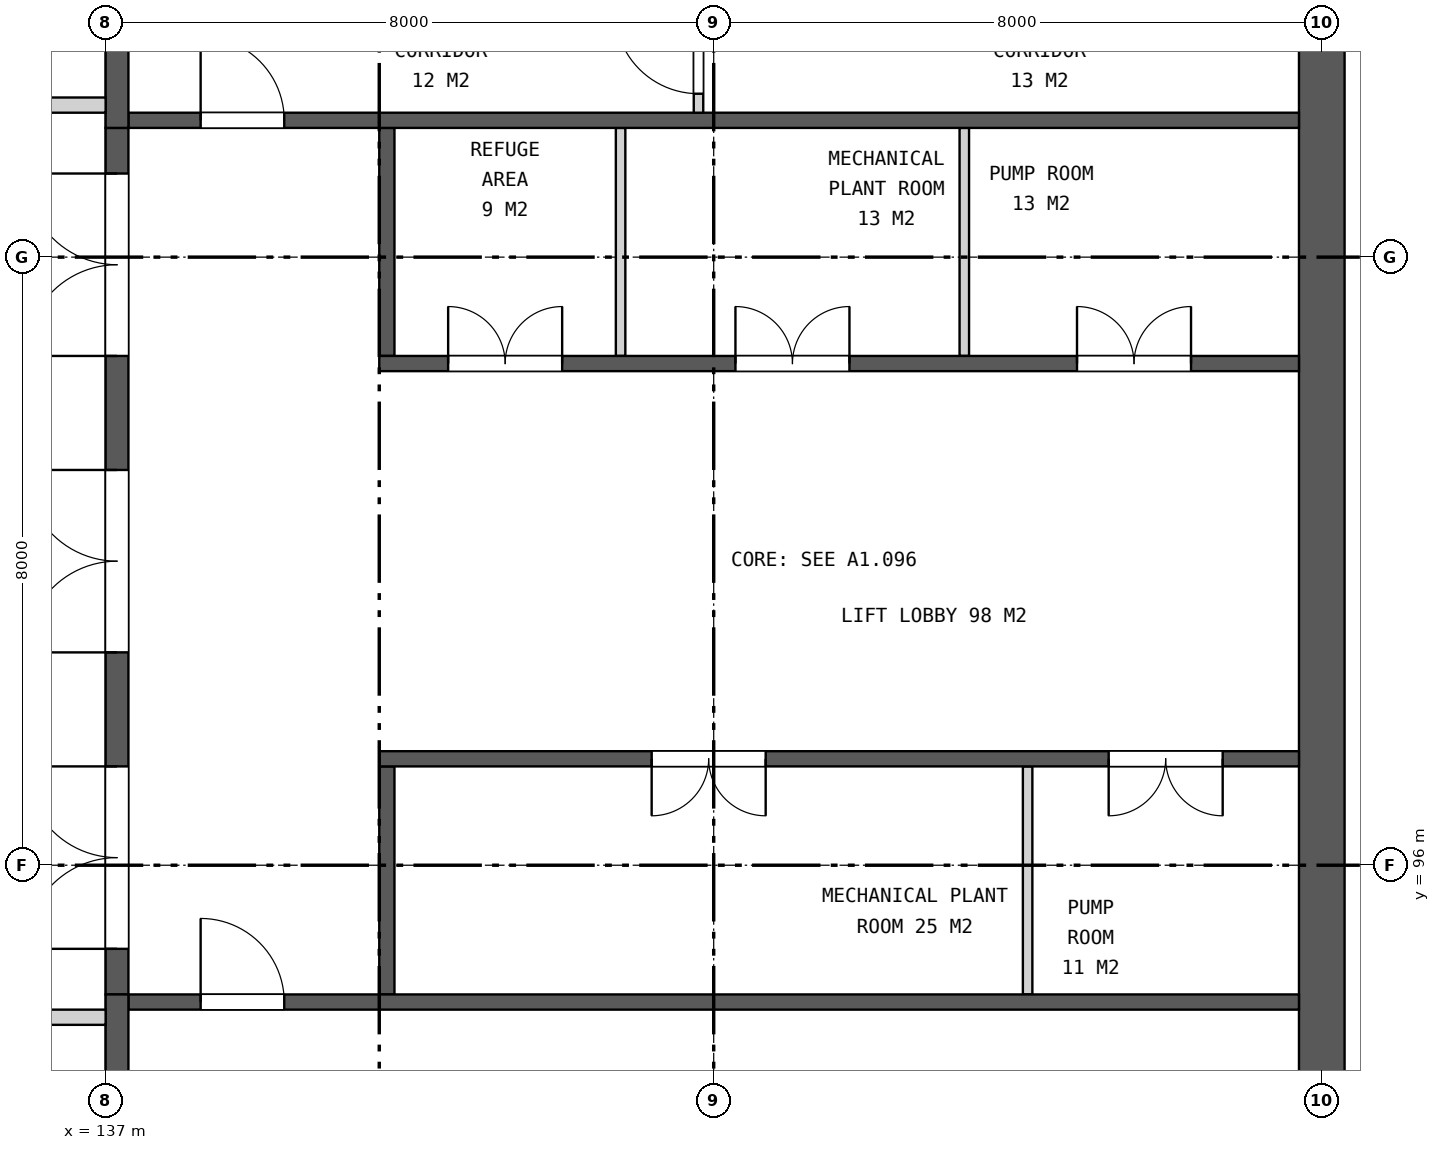
"""IFC4 building model, lengths in metres.
Left out: names, types, materials, properties, quantities, classifications, styles, units other than length and angle.
Written with IfcOpenShell. Run it as: python <this file> out.ifc"""

import sys

from ifc_helpers import new_model, si_unit, direction, frame, frame_2d, origin, place, context, subcontext, project, spatial, rectangle, extrude, element, fill, save


model = new_model("IFC4")
c1 = context("Model", 3, precision=1e-05, world=origin(), true_north=direction((0.0, 1.0)))
c2 = subcontext(c1, "Body", "Model", "MODEL_VIEW")
j1 = project(units=[si_unit("LENGTHUNIT", "METRE"), si_unit("PLANEANGLEUNIT", "RADIAN")], contexts=[c1])
p1 = place(None, origin())
s1 = spatial("IfcSite", under=j1, at=p1, CompositionType="ELEMENT")
p2 = place(p1, origin())
s2 = spatial("IfcBuilding", under=s1, at=p2, CompositionType="ELEMENT")
p3 = place(p2, frame((0.0, 0.0, 237.7)))
s3 = spatial("IfcBuildingStorey", under=s2, at=p3, CompositionType="ELEMENT", Elevation=237.7)
p4 = place(p3, frame((153.0, 88.3, 0.0), z_axis=(0.0, 0.0, 1.0), x_axis=(0.0, 1.0, 0.0)))
e1 = element("IfcWall", 1, at=p4, inside=s3, PredefinedType="SHEAR", context=c2, shape_type="SweptSolid", body=[
    extrude(rectangle(XDim=23.4, YDim=0.6, at=frame_2d((11.7, 0.0))), origin(), (0.0, 0.0, 1.0), 7.4),
])
p5 = place(p3, frame((137.15, 94.3, 0.0), z_axis=(0.0, 0.0, 1.0), x_axis=(0.0, 1.0, 0.0)))
e2 = element("IfcWall", 2, at=p5, inside=s3, PredefinedType="SHEAR", context=c2, shape_type="SweptSolid", body=[
    extrude(rectangle(XDim=11.4, YDim=0.3, at=frame_2d((5.7, 0.0))), origin(), (0.0, 0.0, 1.0), 7.4),
])
p6 = place(p5, frame((0.6, 0.0, 0.0)))
e3 = element("IfcOpeningElement", 3, at=p6, cuts=e2, PredefinedType="OPENING", context=c2, shape_type="SweptSolid", body=[
    extrude(rectangle(XDim=2.4, YDim=2.4, at=frame_2d((1.2, 1.2))), frame((0.0, 0.16, 0.0), z_axis=(0.0, -1.0, 0.0), x_axis=(1.0, 0.0, 0.0)), (0.0, 0.0, 1.0), 0.32),
])
p7 = place(p5, frame((4.5, 0.0, 0.0)))
e4 = element("IfcOpeningElement", 4, at=p7, cuts=e2, PredefinedType="OPENING", context=c2, shape_type="SweptSolid", body=[
    extrude(rectangle(XDim=2.4, YDim=2.4, at=frame_2d((1.2, 1.2))), frame((0.0, 0.16, 0.0), z_axis=(0.0, -1.0, 0.0), x_axis=(1.0, 0.0, 0.0)), (0.0, 0.0, 1.0), 0.32),
])
p8 = place(p5, frame((8.4, 0.0, 0.0)))
e5 = element("IfcOpeningElement", 5, at=p8, cuts=e2, PredefinedType="OPENING", context=c2, shape_type="SweptSolid", body=[
    extrude(rectangle(XDim=2.4, YDim=2.4, at=frame_2d((1.2, 1.2))), frame((0.0, 0.16, 0.0), z_axis=(0.0, -1.0, 0.0), x_axis=(1.0, 0.0, 0.0)), (0.0, 0.0, 1.0), 0.32),
])
p9 = place(p3, frame((140.7, 102.7, 0.0), z_axis=(0.0, 0.0, 1.0), x_axis=(0.0, 1.0, 0.0)))
e6 = element("IfcWall", 6, at=p9, inside=s3, PredefinedType="SHEAR", context=c2, shape_type="SweptSolid", body=[
    extrude(rectangle(XDim=3.0, YDim=0.2, at=frame_2d((1.5, 0.0))), origin(), (0.0, 0.0, 1.0), 7.4),
])
for number, where, z_axis, x_axis in (
    (7, (143.775, 102.7, 0.0), (0.0, 0.0, 1.0), (0.0, 1.0, 0.0)),
    (8, (148.297, 102.7, 0.0), (0.0, 0.0, 1.0), (0.0, 1.0, 0.0)),
):
    element("IfcWall", number, at=place(p3, frame(where, z_axis=z_axis, x_axis=x_axis)), inside=s3, PredefinedType="PARTITIONING", context=c2, shape_type="SweptSolid", body=[
        extrude(rectangle(XDim=3.0, YDim=0.125, at=frame_2d((1.5, 0.0))), origin(), (0.0, 0.0, 1.0), 7.4),
    ])
p10 = place(p3, frame((140.6, 102.6, 0.0), z_axis=(0.0, 0.0, 1.0), x_axis=(1.0, 0.0, 0.0)))
e9 = element("IfcWall", 9, at=p10, inside=s3, PredefinedType="SHEAR", context=c2, shape_type="SweptSolid", body=[
    extrude(rectangle(XDim=12.1, YDim=0.2, at=frame_2d((6.05, 0.0))), origin(), (0.0, 0.0, 1.0), 7.4),
])
p11 = place(p10, frame((0.906, 0.0, 0.0)))
e10 = element("IfcOpeningElement", 10, at=p11, cuts=e9, PredefinedType="OPENING", context=c2, shape_type="SweptSolid", body=[
    extrude(rectangle(XDim=1.5, YDim=2.1, at=frame_2d((0.75, 1.05))), frame((0.0, 0.11, 0.0), z_axis=(0.0, -1.0, 0.0), x_axis=(1.0, 0.0, 0.0)), (0.0, 0.0, 1.0), 0.22),
])
p12 = place(p10, frame((4.686, 0.0, 0.0)))
e11 = element("IfcOpeningElement", 11, at=p12, cuts=e9, PredefinedType="OPENING", context=c2, shape_type="SweptSolid", body=[
    extrude(rectangle(XDim=1.5, YDim=2.1, at=frame_2d((0.75, 1.05))), frame((0.0, 0.11, 0.0), z_axis=(0.0, -1.0, 0.0), x_axis=(1.0, 0.0, 0.0)), (0.0, 0.0, 1.0), 0.22),
])
p13 = place(p10, frame((9.18, 0.0, 0.0)))
e12 = element("IfcOpeningElement", 12, at=p13, cuts=e9, PredefinedType="OPENING", context=c2, shape_type="SweptSolid", body=[
    extrude(rectangle(XDim=1.5, YDim=2.1, at=frame_2d((0.75, 1.05))), frame((0.0, 0.11, 0.0), z_axis=(0.0, -1.0, 0.0), x_axis=(1.0, 0.0, 0.0)), (0.0, 0.0, 1.0), 0.22),
])
p14 = place(p3, frame((140.7, 94.3, 0.0), z_axis=(0.0, 0.0, 1.0), x_axis=(0.0, 1.0, 0.0)))
e13 = element("IfcWall", 13, at=p14, inside=s3, PredefinedType="SHEAR", context=c2, shape_type="SweptSolid", body=[
    extrude(rectangle(XDim=3.0, YDim=0.2, at=frame_2d((1.5, 0.0))), origin(), (0.0, 0.0, 1.0), 7.4),
])
p15 = place(p3, frame((149.13, 94.3, 0.0), z_axis=(0.0, 0.0, 1.0), x_axis=(0.0, 1.0, 0.0)))
e14 = element("IfcWall", 14, at=p15, inside=s3, PredefinedType="PARTITIONING", context=c2, shape_type="SweptSolid", body=[
    extrude(rectangle(XDim=3.0, YDim=0.125, at=frame_2d((1.5, 0.0))), origin(), (0.0, 0.0, 1.0), 7.4),
])
p16 = place(p3, frame((140.6, 97.4, 0.0), z_axis=(0.0, 0.0, 1.0), x_axis=(1.0, 0.0, 0.0)))
e15 = element("IfcWall", 15, at=p16, inside=s3, PredefinedType="SHEAR", context=c2, shape_type="SweptSolid", body=[
    extrude(rectangle(XDim=12.1, YDim=0.2, at=frame_2d((6.05, 0.0))), origin(), (0.0, 0.0, 1.0), 7.4),
])
p17 = place(p16, frame((3.584, 0.0, 0.0)))
e16 = element("IfcOpeningElement", 16, at=p17, cuts=e15, PredefinedType="OPENING", context=c2, shape_type="SweptSolid", body=[
    extrude(rectangle(XDim=1.5, YDim=2.1, at=frame_2d((0.75, 1.05))), frame((0.0, 0.11, 0.0), z_axis=(0.0, -1.0, 0.0), x_axis=(1.0, 0.0, 0.0)), (0.0, 0.0, 1.0), 0.22),
])
p18 = place(p16, frame((9.596, 0.0, 0.0)))
e17 = element("IfcOpeningElement", 17, at=p18, cuts=e15, PredefinedType="OPENING", context=c2, shape_type="SweptSolid", body=[
    extrude(rectangle(XDim=1.5, YDim=2.1, at=frame_2d((0.75, 1.05))), frame((0.0, 0.11, 0.0), z_axis=(0.0, -1.0, 0.0), x_axis=(1.0, 0.0, 0.0)), (0.0, 0.0, 1.0), 0.22),
])
p19 = place(p3, frame((137.3, 105.8, 0.0), z_axis=(0.0, 0.0, 1.0), x_axis=(1.0, 0.0, 0.0)))
e18 = element("IfcWall", 18, at=p19, inside=s3, PredefinedType="SHEAR", context=c2, shape_type="SweptSolid", body=[
    extrude(rectangle(XDim=15.4, YDim=0.2, at=frame_2d((7.7, 0.0))), origin(), (0.0, 0.0, 1.0), 7.4),
])
p20 = place(p19, frame((0.95, 0.0, 0.0)))
e19 = element("IfcOpeningElement", 19, at=p20, cuts=e18, PredefinedType="OPENING", context=c2, shape_type="SweptSolid", body=[
    extrude(rectangle(XDim=1.1, YDim=2.1, at=frame_2d((0.55, 1.05))), frame((0.0, 0.11, 0.0), z_axis=(0.0, -1.0, 0.0), x_axis=(1.0, 0.0, 0.0)), (0.0, 0.0, 1.0), 0.22),
])
p21 = place(p3, frame((137.15, 105.7, 0.0), z_axis=(0.0, 0.0, 1.0), x_axis=(0.0, 1.0, 0.0)))
e20 = element("IfcWall", 20, at=p21, inside=s3, PredefinedType="SHEAR", context=c2, shape_type="SweptSolid", body=[
    extrude(rectangle(XDim=6.0, YDim=0.3, at=frame_2d((3.0, 0.0))), origin(), (0.0, 0.0, 1.0), 7.4),
])
p22 = place(p3, frame((144.8, 105.9, 0.0), z_axis=(0.0, 0.0, 1.0), x_axis=(0.0, 1.0, 0.0)))
e21 = element("IfcWall", 21, at=p22, inside=s3, PredefinedType="PARTITIONING", context=c2, shape_type="SweptSolid", body=[
    extrude(rectangle(XDim=1.6, YDim=0.125, at=frame_2d((0.8, 0.0))), origin(), (0.0, 0.0, 1.0), 7.4),
])
p23 = place(p22, frame((0.25, 0.0, 0.0)))
e22 = element("IfcOpeningElement", 22, at=p23, cuts=e21, PredefinedType="OPENING", context=c2, shape_type="SweptSolid", body=[
    extrude(rectangle(XDim=1.1, YDim=2.1, at=frame_2d((0.55, 1.05))), frame((0.0, 0.073, 0.0), z_axis=(0.0, -1.0, 0.0), x_axis=(1.0, 0.0, 0.0)), (0.0, 0.0, 1.0), 0.145),
])
p24 = place(p3, frame((137.3, 94.2, 0.0), z_axis=(0.0, 0.0, 1.0), x_axis=(1.0, 0.0, 0.0)))
e23 = element("IfcWall", 23, at=p24, inside=s3, PredefinedType="SHEAR", context=c2, shape_type="SweptSolid", body=[
    extrude(rectangle(XDim=15.4, YDim=0.2, at=frame_2d((7.7, 0.0))), origin(), (0.0, 0.0, 1.0), 7.4),
])
p25 = place(p24, frame((0.95, 0.0, 0.0)))
e24 = element("IfcOpeningElement", 24, at=p25, cuts=e23, PredefinedType="OPENING", context=c2, shape_type="SweptSolid", body=[
    extrude(rectangle(XDim=1.1, YDim=2.1, at=frame_2d((0.55, 1.05))), frame((0.0, 0.11, 0.0), z_axis=(0.0, -1.0, 0.0), x_axis=(1.0, 0.0, 0.0)), (0.0, 0.0, 1.0), 0.22),
])
p26 = place(p3, frame((137.15, 88.3, 0.0), z_axis=(0.0, 0.0, 1.0), x_axis=(0.0, 1.0, 0.0)))
e25 = element("IfcWall", 25, at=p26, inside=s3, PredefinedType="SHEAR", context=c2, shape_type="SweptSolid", body=[
    extrude(rectangle(XDim=6.0, YDim=0.3, at=frame_2d((3.0, 0.0))), origin(), (0.0, 0.0, 1.0), 7.4),
])
p27 = place(p3, frame((131.5, 94.0, 0.0), z_axis=(0.0, 0.0, 1.0), x_axis=(1.0, 0.0, 0.0)))
e26 = element("IfcWall", 26, at=p27, inside=s3, PredefinedType="SOLIDWALL", context=c2, shape_type="SweptSolid", body=[
    extrude(rectangle(XDim=5.5, YDim=0.2, at=frame_2d((2.75, 0.0))), origin(), (0.0, 0.0, 1.0), 6.643),
])
p28 = place(p27, frame((2.25, 0.0, 0.0)))
e27 = element("IfcOpeningElement", 27, at=p28, cuts=e26, PredefinedType="OPENING", context=c2, shape_type="SweptSolid", body=[
    extrude(rectangle(XDim=1.0, YDim=2.1, at=frame_2d((0.5, 1.05))), frame((0.0, 0.11, 0.0), z_axis=(0.0, -1.0, 0.0), x_axis=(1.0, 0.0, 0.0)), (0.0, 0.0, 1.0), 0.22),
])
p29 = place(p3, frame((131.5, 106.0, 0.0), z_axis=(0.0, 0.0, 1.0), x_axis=(1.0, 0.0, 0.0)))
e28 = element("IfcWall", 28, at=p29, inside=s3, PredefinedType="SOLIDWALL", context=c2, shape_type="SweptSolid", body=[
    extrude(rectangle(XDim=5.5, YDim=0.2, at=frame_2d((2.75, 0.0))), origin(), (0.0, 0.0, 1.0), 6.643),
])
p30 = place(p29, frame((2.25, 0.0, 0.0)))
e29 = element("IfcOpeningElement", 29, at=p30, cuts=e28, PredefinedType="OPENING", context=c2, shape_type="SweptSolid", body=[
    extrude(rectangle(XDim=1.0, YDim=2.1, at=frame_2d((0.5, 1.05))), frame((0.0, 0.11, 0.0), z_axis=(0.0, -1.0, 0.0), x_axis=(1.0, 0.0, 0.0)), (0.0, 0.0, 1.0), 0.22),
])
p31 = place(p6, origin())
e30 = element("IfcDoor", 30, at=p31, inside=s3, OperationType="DOUBLE_DOOR_SINGLE_SWING", PredefinedType="DOOR", context=c2, shape_type="SweptSolid", body=[
    extrude(rectangle(XDim=2.4, YDim=2.4, at=frame_2d((1.2, 1.2))), frame((0.0, 0.025, 0.0), z_axis=(0.0, -1.0, 0.0), x_axis=(1.0, 0.0, 0.0)), (0.0, 0.0, 1.0), 0.05),
])
fill(e3, e30)
p32 = place(p7, origin())
e31 = element("IfcDoor", 31, at=p32, inside=s3, OperationType="DOUBLE_DOOR_SINGLE_SWING", PredefinedType="DOOR", context=c2, shape_type="SweptSolid", body=[
    extrude(rectangle(XDim=2.4, YDim=2.4, at=frame_2d((1.2, 1.2))), frame((0.0, 0.025, 0.0), z_axis=(0.0, -1.0, 0.0), x_axis=(1.0, 0.0, 0.0)), (0.0, 0.0, 1.0), 0.05),
])
fill(e4, e31)
p33 = place(p8, origin())
e32 = element("IfcDoor", 32, at=p33, inside=s3, OperationType="DOUBLE_DOOR_SINGLE_SWING", PredefinedType="DOOR", context=c2, shape_type="SweptSolid", body=[
    extrude(rectangle(XDim=2.4, YDim=2.4, at=frame_2d((1.2, 1.2))), frame((0.0, 0.025, 0.0), z_axis=(0.0, -1.0, 0.0), x_axis=(1.0, 0.0, 0.0)), (0.0, 0.0, 1.0), 0.05),
])
fill(e5, e32)
p34 = place(p11, origin())
e33 = element("IfcDoor", 33, at=p34, inside=s3, OperationType="DOUBLE_DOOR_SINGLE_SWING", PredefinedType="DOOR", context=c2, shape_type="SweptSolid", body=[
    extrude(rectangle(XDim=1.5, YDim=2.1, at=frame_2d((0.75, 1.05))), frame((0.0, 0.025, 0.0), z_axis=(0.0, -1.0, 0.0), x_axis=(1.0, 0.0, 0.0)), (0.0, 0.0, 1.0), 0.05),
])
fill(e10, e33)
p35 = place(p12, origin())
e34 = element("IfcDoor", 34, at=p35, inside=s3, OperationType="DOUBLE_DOOR_SINGLE_SWING", PredefinedType="DOOR", context=c2, shape_type="SweptSolid", body=[
    extrude(rectangle(XDim=1.5, YDim=2.1, at=frame_2d((0.75, 1.05))), frame((0.0, 0.025, 0.0), z_axis=(0.0, -1.0, 0.0), x_axis=(1.0, 0.0, 0.0)), (0.0, 0.0, 1.0), 0.05),
])
fill(e11, e34)
p36 = place(p13, origin())
e35 = element("IfcDoor", 35, at=p36, inside=s3, OperationType="DOUBLE_DOOR_SINGLE_SWING", PredefinedType="DOOR", context=c2, shape_type="SweptSolid", body=[
    extrude(rectangle(XDim=1.5, YDim=2.1, at=frame_2d((0.75, 1.05))), frame((0.0, 0.025, 0.0), z_axis=(0.0, -1.0, 0.0), x_axis=(1.0, 0.0, 0.0)), (0.0, 0.0, 1.0), 0.05),
])
fill(e12, e35)
p37 = place(p17, frame((1.5, 0.0, 0.0), z_axis=(0.0, 0.0, 1.0), x_axis=(-1.0, 0.0, 0.0)))
e36 = element("IfcDoor", 36, at=p37, inside=s3, OperationType="DOUBLE_DOOR_SINGLE_SWING", PredefinedType="DOOR", context=c2, shape_type="SweptSolid", body=[
    extrude(rectangle(XDim=1.5, YDim=2.1, at=frame_2d((0.75, 1.05))), frame((0.0, 0.025, 0.0), z_axis=(0.0, -1.0, 0.0), x_axis=(1.0, 0.0, 0.0)), (0.0, 0.0, 1.0), 0.05),
])
fill(e16, e36)
p38 = place(p18, frame((1.5, 0.0, 0.0), z_axis=(0.0, 0.0, 1.0), x_axis=(-1.0, 0.0, 0.0)))
e37 = element("IfcDoor", 37, at=p38, inside=s3, OperationType="DOUBLE_DOOR_SINGLE_SWING", PredefinedType="DOOR", context=c2, shape_type="SweptSolid", body=[
    extrude(rectangle(XDim=1.5, YDim=2.1, at=frame_2d((0.75, 1.05))), frame((0.0, 0.025, 0.0), z_axis=(0.0, -1.0, 0.0), x_axis=(1.0, 0.0, 0.0)), (0.0, 0.0, 1.0), 0.05),
])
fill(e17, e37)
p39 = place(p20, origin())
e38 = element("IfcDoor", 38, at=p39, inside=s3, OperationType="SINGLE_SWING_LEFT", PredefinedType="DOOR", context=c2, shape_type="SweptSolid", body=[
    extrude(rectangle(XDim=1.1, YDim=2.1, at=frame_2d((0.55, 1.05))), frame((0.0, 0.025, 0.0), z_axis=(0.0, -1.0, 0.0), x_axis=(1.0, 0.0, 0.0)), (0.0, 0.0, 1.0), 0.05),
])
fill(e19, e38)
p40 = place(p23, origin())
e39 = element("IfcDoor", 39, at=p40, inside=s3, OperationType="SINGLE_SWING_RIGHT", PredefinedType="DOOR", context=c2, shape_type="SweptSolid", body=[
    extrude(rectangle(XDim=1.1, YDim=2.1, at=frame_2d((0.55, 1.05))), frame((0.0, 0.025, 0.0), z_axis=(0.0, -1.0, 0.0), x_axis=(1.0, 0.0, 0.0)), (0.0, 0.0, 1.0), 0.05),
])
fill(e22, e39)
p41 = place(p25, origin())
e40 = element("IfcDoor", 40, at=p41, inside=s3, OperationType="SINGLE_SWING_LEFT", PredefinedType="DOOR", context=c2, shape_type="SweptSolid", body=[
    extrude(rectangle(XDim=1.1, YDim=2.1, at=frame_2d((0.55, 1.05))), frame((0.0, 0.025, 0.0), z_axis=(0.0, -1.0, 0.0), x_axis=(1.0, 0.0, 0.0)), (0.0, 0.0, 1.0), 0.05),
])
fill(e24, e40)
save(model, sys.argv[1])
